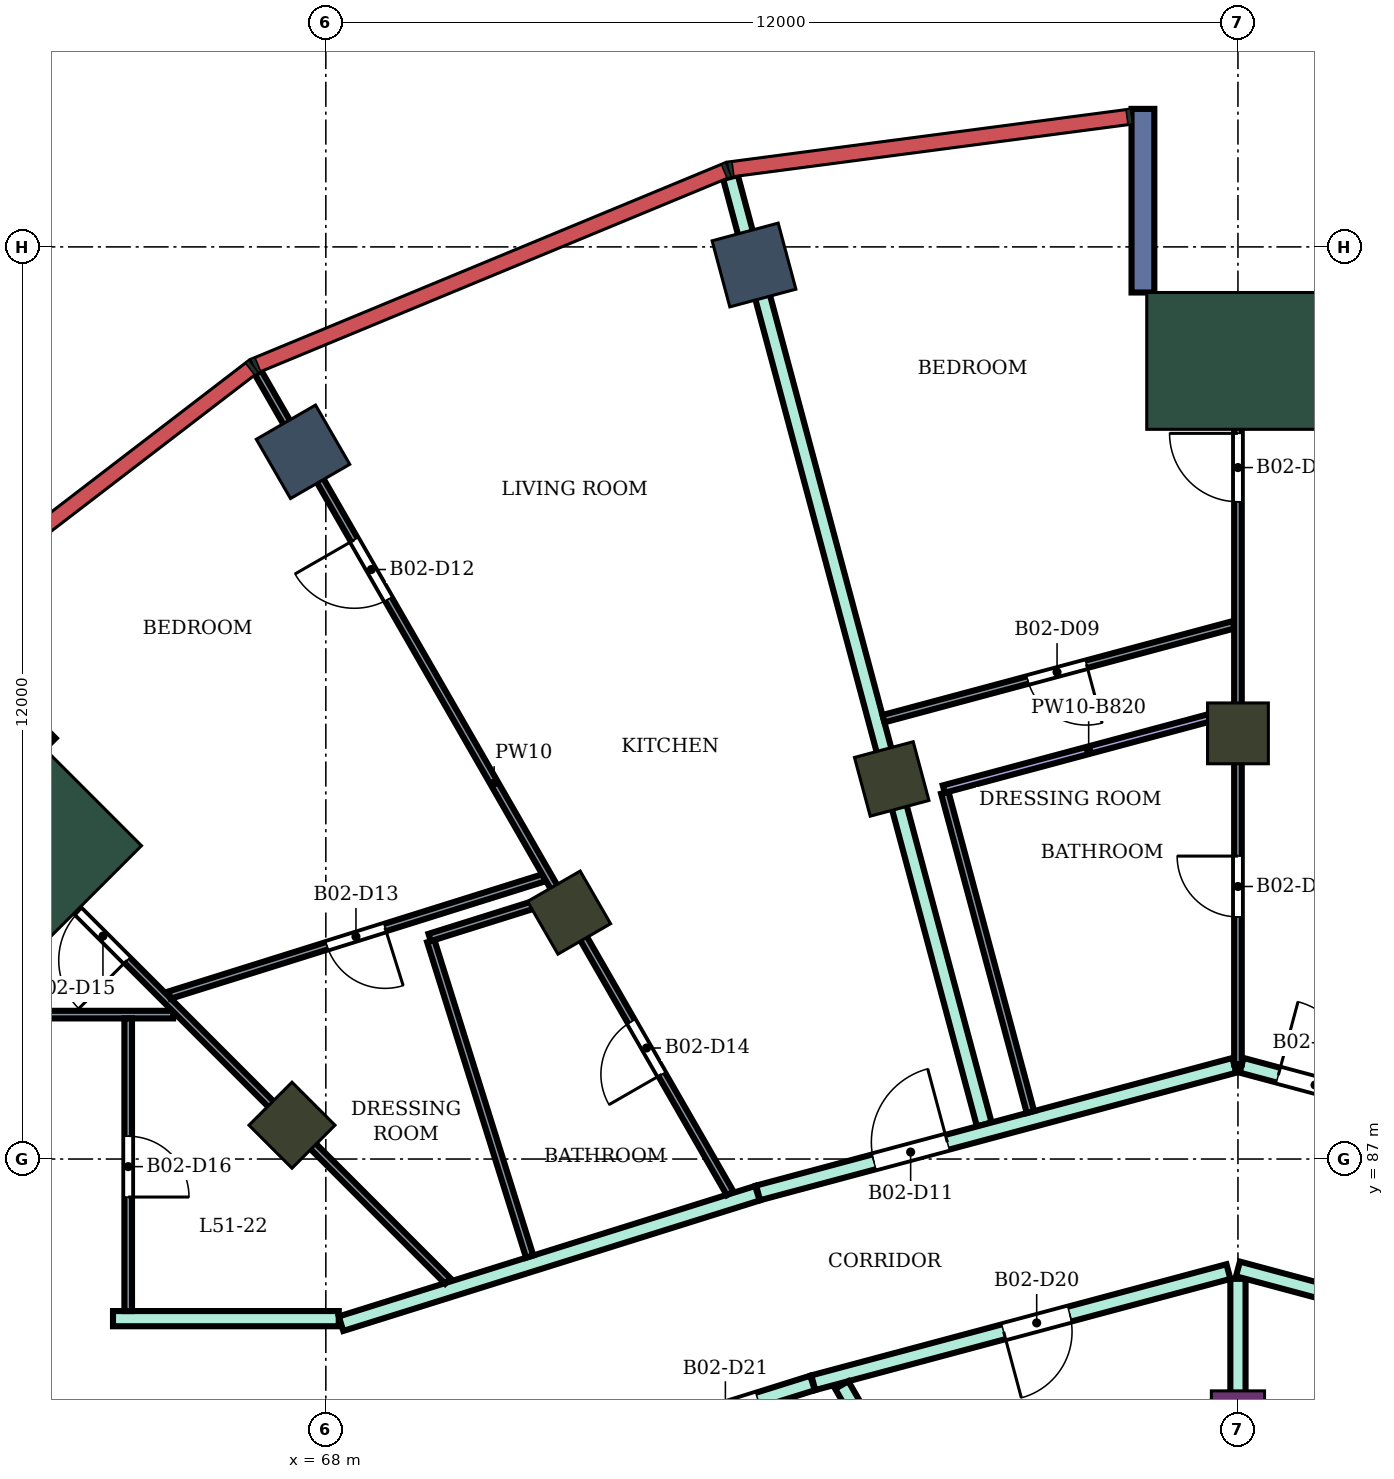
"""IFC4 building model, lengths in metres.
Left out: names, types, materials, properties, quantities, classifications, styles, units other than length and angle.
Written with IfcOpenShell. Run it as: python <this file> out.ifc"""

import sys

from ifc_helpers import new_model, si_unit, direction, frame, frame_2d, origin, origin_2d, place, context, subcontext, project, spatial, rectangle, extrude, element, fill, save


model = new_model("IFC4")
c1 = context("Model", 3, precision=1e-05, world=origin(), true_north=direction((0.0, 1.0)))
c2 = subcontext(c1, "Body", "Model", "MODEL_VIEW")
j1 = project(units=[si_unit("LENGTHUNIT", "METRE"), si_unit("PLANEANGLEUNIT", "RADIAN")], contexts=[c1])
p1 = place(None, origin())
s1 = spatial("IfcSite", under=j1, at=p1, CompositionType="ELEMENT")
p2 = place(p1, origin())
s2 = spatial("IfcBuilding", under=s1, at=p2, CompositionType="ELEMENT")
p3 = place(p2, frame((0.0, 0.0, 220.9)))
s3 = spatial("IfcBuildingStorey", under=s2, at=p3, CompositionType="ELEMENT", Elevation=220.9)
for number, where, z_axis, x_axis in (
    (1, (73.633, 98.762, 0.0), (0.0, 0.0, 1.0), (-0.259, 0.966, 0.0)),
    (2, (67.7, 96.304, 0.0), (0.0, 0.0, 1.0), (-0.5, 0.866, 0.0)),
):
    element("IfcColumn", number, at=place(p3, frame(where, z_axis=z_axis, x_axis=x_axis)), inside=s3, PredefinedType="COLUMN", context=c2, shape_type="SweptSolid", body=[
        extrude(rectangle(XDim=0.9, YDim=0.9, at=origin_2d()), origin(), (0.0, 0.0, 1.0), 4.2),
    ])
for number, where, z_axis, x_axis in (
    (3, (80.0, 92.6, 0.0), (0.0, 0.0, 1.0), (0.0, 1.0, 0.0)),
    (4, (75.445, 92.0, 0.0), (0.0, 0.0, 1.0), (-0.259, 0.966, 0.0)),
    (5, (71.2, 90.242, 0.0), (0.0, 0.0, 1.0), (-0.5, 0.866, 0.0)),
    (6, (67.555, 87.445, 0.0), (0.0, 0.0, 1.0), (-0.707, 0.707, 0.0)),
):
    element("IfcColumn", number, at=place(p3, frame(where, z_axis=z_axis, x_axis=x_axis)), inside=s3, PredefinedType="COLUMN", context=c2, shape_type="SweptSolid", body=[
        extrude(rectangle(XDim=0.8, YDim=0.8, at=origin_2d()), origin(), (0.0, 0.0, 1.0), 4.2),
    ])
p4 = place(p3, frame((80.0, 83.6, 0.0), z_axis=(0.0, 0.0, 1.0), x_axis=(0.0, 1.0, 0.0)))
e7 = element("IfcColumn", 7, at=p4, inside=s3, PredefinedType="COLUMN", context=c2, shape_type="SweptSolid", body=[
    extrude(rectangle(XDim=0.7, YDim=0.7, at=origin_2d()), origin(), (0.0, 0.0, 1.0), 4.2),
])
for number, where, z_axis, x_axis in (
    (8, (80.0, 97.5, 0.0), (0.0, 0.0, 1.0), (0.0, 1.0, 0.0)),
    (9, (64.09, 90.91, 0.0), (0.0, 0.0, 1.0), (-0.707, 0.707, 0.0)),
):
    element("IfcColumn", number, at=place(p3, frame(where, z_axis=z_axis, x_axis=x_axis)), inside=s3, PredefinedType="COLUMN", context=c2, shape_type="SweptSolid", body=[
        extrude(rectangle(XDim=1.8, YDim=2.4, at=origin_2d()), origin(), (0.0, 0.0, 1.0), 4.2),
    ])
for number, where, z_axis, x_axis in (
    (10, (78.75, 98.4, 0.0), (0.0, 0.0, 1.0), (0.0, 1.0, 0.0)),
    (11, (64.338, 92.43, 0.0), (0.0, 0.0, 1.0), (-0.707, 0.707, 0.0)),
):
    element("IfcWall", number, at=place(p3, frame(where, z_axis=z_axis, x_axis=x_axis)), inside=s3, PredefinedType="NOTDEFINED", context=c2, shape_type="SweptSolid", body=[
        extrude(rectangle(XDim=2.416, YDim=0.3, at=frame_2d((1.208, 0.0))), origin(), (0.0, 0.0, 1.0), 4.2),
    ])
p5 = place(p3, frame((65.2, 84.9, 0.0), z_axis=(0.0, 0.0, 1.0), x_axis=(1.0, 0.0, 0.0)))
e12 = element("IfcWall", 12, at=p5, inside=s3, PredefinedType="PARTITIONING", context=c2, shape_type="SweptSolid", body=[
    extrude(rectangle(XDim=2.97, YDim=0.2, at=frame_2d((1.485, 0.0))), origin(), (0.0, 0.0, 1.0), 3.75),
])
p6 = place(p3, frame((68.2, 84.834, 0.0), z_axis=(0.0, 0.0, 1.0), x_axis=(0.954260265251, 0.298977166624, 0.0)))
e13 = element("IfcWall", 13, at=p6, inside=s3, PredefinedType="PARTITIONING", context=c2, shape_type="SweptSolid", body=[
    extrude(rectangle(XDim=5.741, YDim=0.2, at=frame_2d((2.87, 0.0))), origin(), (0.0, 0.0, 1.0), 3.75),
])
p7 = place(p3, frame((72.1, 83.332, 0.0), z_axis=(0.0, 0.0, 1.0), x_axis=(0.954233106619, 0.299063836383, 0.0)))
e14 = element("IfcWall", 14, at=p7, inside=s3, PredefinedType="PARTITIONING", context=c2, shape_type="SweptSolid", body=[
    extrude(rectangle(XDim=2.414, YDim=0.2, at=frame_2d((1.207, 0.0))), origin(), (0.0, 0.0, 1.0), 3.75),
])
p8 = place(p7, frame((0.762, 0.0, 0.0)))
e15 = element("IfcOpeningElement", 15, at=p8, cuts=e14, PredefinedType="OPENING", context=c2, shape_type="SweptSolid", body=[
    extrude(rectangle(XDim=0.9, YDim=2.1, at=frame_2d((0.45, 1.05))), frame((0.0, 0.11, 0.0), z_axis=(0.0, -1.0, 0.0), x_axis=(1.0, 0.0, 0.0)), (0.0, 0.0, 1.0), 0.22),
])
p9 = place(p3, frame((73.323, 99.919, 0.0), z_axis=(0.0, 0.0, 1.0), x_axis=(0.258768239436, -0.965939438194, 0.0)))
e16 = element("IfcWall", 16, at=p9, inside=s3, PredefinedType="PARTITIONING", context=c2, shape_type="SweptSolid", body=[
    extrude(rectangle(XDim=12.904, YDim=0.2, at=frame_2d((6.452, 0.0))), origin(), (0.0, 0.0, 1.0), 3.75),
])
p10 = place(p3, frame((73.687, 86.554, 0.0), z_axis=(0.0, 0.0, 1.0), x_axis=(0.96595258731, 0.258719150952, 0.0)))
e17 = element("IfcWall", 17, at=p10, inside=s3, PredefinedType="PARTITIONING", context=c2, shape_type="SweptSolid", body=[
    extrude(rectangle(XDim=6.486, YDim=0.2, at=frame_2d((3.243, 0.0))), origin(), (0.0, 0.0, 1.0), 3.75),
])
p11 = place(p10, frame((1.578, 0.0, 0.0)))
e18 = element("IfcOpeningElement", 18, at=p11, cuts=e17, PredefinedType="OPENING", context=c2, shape_type="SweptSolid", body=[
    extrude(rectangle(XDim=1.0, YDim=2.1, at=frame_2d((0.5, 1.05))), frame((0.0, 0.11, 0.0), z_axis=(0.0, -1.0, 0.0), x_axis=(1.0, 0.0, 0.0)), (0.0, 0.0, 1.0), 0.22),
])
p12 = place(p3, frame((74.413, 84.057, 0.0), z_axis=(0.0, 0.0, 1.0), x_axis=(0.965972135939, 0.258646153246, 0.0)))
e19 = element("IfcWall", 19, at=p12, inside=s3, PredefinedType="PARTITIONING", context=c2, shape_type="SweptSolid", body=[
    extrude(rectangle(XDim=5.654, YDim=0.2, at=frame_2d((2.827, 0.0))), origin(), (0.0, 0.0, 1.0), 3.75),
])
p13 = place(p12, frame((2.593, 0.0, 0.0)))
e20 = element("IfcOpeningElement", 20, at=p13, cuts=e19, PredefinedType="OPENING", context=c2, shape_type="SweptSolid", body=[
    extrude(rectangle(XDim=0.9, YDim=2.1, at=frame_2d((0.45, 1.05))), frame((0.0, 0.11, 0.0), z_axis=(0.0, -1.0, 0.0), x_axis=(1.0, 0.0, 0.0)), (0.0, 0.0, 1.0), 0.22),
])
p14 = place(p3, frame((74.787, 84.027, 0.0), z_axis=(0.0, 0.0, 1.0), x_axis=(0.500079107518, -0.86597972622, 0.0)))
e21 = element("IfcWall", 21, at=p14, inside=s3, PredefinedType="PARTITIONING", context=c2, shape_type="SweptSolid", body=[
    extrude(rectangle(XDim=2.726, YDim=0.2, at=frame_2d((1.363, 0.0))), origin(), (0.0, 0.0, 1.0), 3.75),
])
p15 = place(p3, frame((80.0, 82.699, 0.0), z_axis=(0.0, 0.0, 1.0), x_axis=(0.0, 1.0, 0.0)))
e22 = element("IfcWall", 22, at=p15, inside=s3, PredefinedType="PARTITIONING", context=c2, shape_type="SweptSolid", body=[
    extrude(rectangle(XDim=2.725, YDim=0.2, at=frame_2d((1.363, 0.0))), origin(), (0.0, 0.0, 1.0), 3.75),
])
p16 = place(p3, frame((80.0, 85.554, 0.0), z_axis=(0.0, 0.0, 1.0), x_axis=(0.965928989968, -0.258807237802, 0.0)))
e23 = element("IfcWall", 23, at=p16, inside=s3, PredefinedType="PARTITIONING", context=c2, shape_type="SweptSolid", body=[
    extrude(rectangle(XDim=5.774, YDim=0.2, at=frame_2d((2.887, 0.0))), origin(), (0.0, 0.0, 1.0), 3.75),
])
p17 = place(p16, frame((2.292, 0.0, 0.0)))
e24 = element("IfcOpeningElement", 24, at=p17, cuts=e23, PredefinedType="OPENING", context=c2, shape_type="SweptSolid", body=[
    extrude(rectangle(XDim=0.9, YDim=2.1, at=frame_2d((0.45, 1.05))), frame((0.0, 0.11, 0.0), z_axis=(0.0, -1.0, 0.0), x_axis=(1.0, 0.0, 0.0)), (0.0, 0.0, 1.0), 0.22),
])
p18 = place(p3, frame((80.048, 88.233, 0.0), z_axis=(0.0, 0.0, 1.0), x_axis=(0.965865387308, -0.259044501198, 0.0)))
e25 = element("IfcWall", 25, at=p18, inside=s3, PredefinedType="PARTITIONING", context=c2, shape_type="SweptSolid", body=[
    extrude(rectangle(XDim=6.476, YDim=0.2, at=frame_2d((3.238, 0.0))), origin(), (0.0, 0.0, 1.0), 3.75),
])
p19 = place(p18, frame((0.5, 0.0, 0.0)))
e26 = element("IfcOpeningElement", 26, at=p19, cuts=e25, PredefinedType="OPENING", context=c2, shape_type="SweptSolid", body=[
    extrude(rectangle(XDim=1.0, YDim=2.1, at=frame_2d((0.5, 1.05))), frame((0.0, 0.11, 0.0), z_axis=(0.0, -1.0, 0.0), x_axis=(1.0, 0.0, 0.0)), (0.0, 0.0, 1.0), 0.22),
])
p20 = place(p3, frame((58.379, 88.9, 0.0), z_axis=(0.0, 0.0, 1.0), x_axis=(1.0, 0.0, 0.0)))
e27 = element("IfcWall", 27, at=p20, inside=s3, PredefinedType="PARTITIONING", context=c2, shape_type="SweptSolid", body=[
    extrude(rectangle(XDim=7.612, YDim=0.1, at=frame_2d((3.806, 0.0))), origin(), (0.0, 0.0, 1.0), 3.75),
])
p21 = place(p20, frame((3.176, 0.0, 0.0)))
e28 = element("IfcOpeningElement", 28, at=p21, cuts=e27, PredefinedType="OPENING", context=c2, shape_type="SweptSolid", body=[
    extrude(rectangle(XDim=0.8, YDim=2.1, at=frame_2d((0.4, 1.05))), frame((0.0, 0.06, 0.0), z_axis=(0.0, -1.0, 0.0), x_axis=(1.0, 0.0, 0.0)), (0.0, 0.0, 1.0), 0.12),
])
p22 = place(p3, frame((63.596, 91.406, 0.0), z_axis=(0.0, 0.0, 1.0), x_axis=(0.70700623685, -0.707207311228, 0.0)))
e29 = element("IfcWall", 29, at=p22, inside=s3, PredefinedType="PARTITIONING", context=c2, shape_type="SweptSolid", body=[
    extrude(rectangle(XDim=8.499, YDim=0.1, at=frame_2d((4.25, 0.0))), origin(), (0.0, 0.0, 1.0), 3.75),
])
p23 = place(p22, frame((1.632, 0.0, 0.0)))
e30 = element("IfcOpeningElement", 30, at=p23, cuts=e29, PredefinedType="OPENING", context=c2, shape_type="SweptSolid", body=[
    extrude(rectangle(XDim=0.9, YDim=2.1, at=frame_2d((0.45, 1.05))), frame((0.0, 0.06, 0.0), z_axis=(0.0, -1.0, 0.0), x_axis=(1.0, 0.0, 0.0)), (0.0, 0.0, 1.0), 0.12),
])
p24 = place(p3, frame((65.4, 85.0, 0.0), z_axis=(0.0, 0.0, 1.0), x_axis=(0.0, 1.0, 0.0)))
e31 = element("IfcWall", 31, at=p24, inside=s3, PredefinedType="PARTITIONING", context=c2, shape_type="SweptSolid", body=[
    extrude(rectangle(XDim=3.85, YDim=0.1, at=frame_2d((1.925, 0.0))), origin(), (0.0, 0.0, 1.0), 3.75),
])
p25 = place(p24, frame((1.5, 0.0, 0.0)))
e32 = element("IfcOpeningElement", 32, at=p25, cuts=e31, PredefinedType="OPENING", context=c2, shape_type="SweptSolid", body=[
    extrude(rectangle(XDim=0.8, YDim=2.1, at=frame_2d((0.4, 1.05))), frame((0.0, 0.06, 0.0), z_axis=(0.0, -1.0, 0.0), x_axis=(1.0, 0.0, 0.0)), (0.0, 0.0, 1.0), 0.12),
])
p26 = place(p3, frame((65.944, 89.157, 0.0), z_axis=(0.0, 0.0, 1.0), x_axis=(0.954235485309, 0.299056246512, 0.0)))
e33 = element("IfcWall", 33, at=p26, inside=s3, PredefinedType="PARTITIONING", context=c2, shape_type="SweptSolid", body=[
    extrude(rectangle(XDim=5.159, YDim=0.1, at=frame_2d((2.58, 0.0))), origin(), (0.0, 0.0, 1.0), 3.75),
])
p27 = place(p26, frame((2.17, 0.0, 0.0)))
e34 = element("IfcOpeningElement", 34, at=p27, cuts=e33, PredefinedType="OPENING", context=c2, shape_type="SweptSolid", body=[
    extrude(rectangle(XDim=0.8, YDim=2.1, at=frame_2d((0.4, 1.05))), frame((0.0, 0.06, 0.0), z_axis=(0.0, -1.0, 0.0), x_axis=(1.0, 0.0, 0.0)), (0.0, 0.0, 1.0), 0.12),
])
p28 = place(p3, frame((67.109, 97.346, 0.0), z_axis=(0.0, 0.0, 1.0), x_axis=(0.498583439824, -0.866841711925, 0.0)))
e35 = element("IfcWall", 35, at=p28, inside=s3, PredefinedType="PARTITIONING", context=c2, shape_type="SweptSolid", body=[
    extrude(rectangle(XDim=12.456, YDim=0.1, at=frame_2d((6.228, 0.0))), origin(), (0.0, 0.0, 1.0), 3.75),
])
p29 = place(p28, frame((2.538, 0.0, 0.0)))
e36 = element("IfcOpeningElement", 36, at=p29, cuts=e35, PredefinedType="OPENING", context=c2, shape_type="SweptSolid", body=[
    extrude(rectangle(XDim=0.9, YDim=2.1, at=frame_2d((0.45, 1.05))), frame((0.0, 0.06, 0.0), z_axis=(0.0, -1.0, 0.0), x_axis=(1.0, 0.0, 0.0)), (0.0, 0.0, 1.0), 0.12),
])
p30 = place(p28, frame((9.85, 0.0, 0.0)))
e37 = element("IfcOpeningElement", 37, at=p30, cuts=e35, PredefinedType="OPENING", context=c2, shape_type="SweptSolid", body=[
    extrude(rectangle(XDim=0.8, YDim=2.1, at=frame_2d((0.4, 1.05))), frame((0.0, 0.06, 0.0), z_axis=(0.0, -1.0, 0.0), x_axis=(1.0, 0.0, 0.0)), (0.0, 0.0, 1.0), 0.12),
])
p31 = place(p3, frame((69.381, 89.867, 0.0), z_axis=(0.0, 0.0, 1.0), x_axis=(0.29908659099, -0.954225974856, 0.0)))
e38 = element("IfcWall", 38, at=p31, inside=s3, PredefinedType="PARTITIONING", context=c2, shape_type="SweptSolid", body=[
    extrude(rectangle(XDim=4.35, YDim=0.1, at=frame_2d((2.175, 0.0))), origin(), (0.0, 0.0, 1.0), 3.75),
])
p32 = place(p3, frame((69.366, 89.915, 0.0), z_axis=(0.0, 0.0, 1.0), x_axis=(0.954163830168, 0.299284789457, 0.0)))
e39 = element("IfcWall", 39, at=p32, inside=s3, PredefinedType="PARTITIONING", context=c2, shape_type="SweptSolid", body=[
    extrude(rectangle(XDim=1.734, YDim=0.1, at=frame_2d((0.867, 0.0))), origin(), (0.0, 0.0, 1.0), 3.75),
])
p33 = place(p3, frame((75.337, 92.793, 0.0), z_axis=(0.0, 0.0, 1.0), x_axis=(0.965840336715, 0.259137886026, 0.0)))
e40 = element("IfcWall", 40, at=p33, inside=s3, PredefinedType="PARTITIONING", context=c2, shape_type="SweptSolid", body=[
    extrude(rectangle(XDim=4.768, YDim=0.1, at=frame_2d((2.384, 0.0))), origin(), (0.0, 0.0, 1.0), 3.75),
])
p34 = place(p33, frame((1.964, 0.0, 0.0)))
e41 = element("IfcOpeningElement", 41, at=p34, cuts=e40, PredefinedType="OPENING", context=c2, shape_type="SweptSolid", body=[
    extrude(rectangle(XDim=0.8, YDim=2.1, at=frame_2d((0.4, 1.05))), frame((0.0, 0.06, 0.0), z_axis=(0.0, -1.0, 0.0), x_axis=(1.0, 0.0, 0.0)), (0.0, 0.0, 1.0), 0.12),
])
p35 = place(p3, frame((76.143, 91.819, 0.0), z_axis=(0.0, 0.0, 1.0), x_axis=(0.259115794116, -0.965846263771, 0.0)))
e42 = element("IfcWall", 42, at=p35, inside=s3, PredefinedType="PARTITIONING", context=c2, shape_type="SweptSolid", body=[
    extrude(rectangle(XDim=4.349, YDim=0.1, at=frame_2d((2.175, 0.0))), origin(), (0.0, 0.0, 1.0), 3.75),
])
p36 = place(p3, frame((76.13, 91.867, 0.0), z_axis=(0.0, 0.0, 1.0), x_axis=(0.965860204905, 0.259063823373, 0.0)))
e43 = element("IfcWall", 43, at=p36, inside=s3, PredefinedType="PARTITIONING", context=c2, shape_type="SweptSolid", body=[
    extrude(rectangle(XDim=3.947, YDim=0.1, at=frame_2d((1.973, 0.0))), origin(), (0.0, 0.0, 1.0), 3.38),
])
p37 = place(p3, frame((80.0, 88.246, 0.0), z_axis=(0.0, 0.0, 1.0), x_axis=(0.0, 1.0, 0.0)))
e44 = element("IfcWall", 44, at=p37, inside=s3, PredefinedType="PARTITIONING", context=c2, shape_type="SweptSolid", body=[
    extrude(rectangle(XDim=9.954, YDim=0.1, at=frame_2d((4.977, 0.0))), origin(), (0.0, 0.0, 1.0), 3.75),
])
p38 = place(p37, frame((7.401, 0.0, 0.0)))
e45 = element("IfcOpeningElement", 45, at=p38, cuts=e44, PredefinedType="OPENING", context=c2, shape_type="SweptSolid", body=[
    extrude(rectangle(XDim=0.9, YDim=2.1, at=frame_2d((0.45, 1.05))), frame((0.0, 0.06, 0.0), z_axis=(0.0, -1.0, 0.0), x_axis=(1.0, 0.0, 0.0)), (0.0, 0.0, 1.0), 0.12),
])
p39 = place(p37, frame((1.939, 0.0, 0.0)))
e46 = element("IfcOpeningElement", 46, at=p39, cuts=e44, PredefinedType="OPENING", context=c2, shape_type="SweptSolid", body=[
    extrude(rectangle(XDim=0.8, YDim=2.1, at=frame_2d((0.4, 1.05))), frame((0.0, 0.06, 0.0), z_axis=(0.0, -1.0, 0.0), x_axis=(1.0, 0.0, 0.0)), (0.0, 0.0, 1.0), 0.12),
])
p40 = place(p19, origin())
e47 = element("IfcDoor", 47, at=p40, inside=s3, OperationType="SINGLE_SWING_LEFT", PredefinedType="DOOR", context=c2, shape_type="SweptSolid", body=[
    extrude(rectangle(XDim=1.0, YDim=2.1, at=frame_2d((0.5, 1.05))), frame((0.0, 0.025, 0.0), z_axis=(0.0, -1.0, 0.0), x_axis=(1.0, 0.0, 0.0)), (0.0, 0.0, 1.0), 0.05),
])
fill(e26, e47)
p41 = place(p38, origin())
e48 = element("IfcDoor", 48, at=p41, inside=s3, OperationType="SINGLE_SWING_RIGHT", PredefinedType="DOOR", context=c2, shape_type="SweptSolid", body=[
    extrude(rectangle(XDim=0.9, YDim=2.1, at=frame_2d((0.45, 1.05))), frame((0.0, 0.025, 0.0), z_axis=(0.0, -1.0, 0.0), x_axis=(1.0, 0.0, 0.0)), (0.0, 0.0, 1.0), 0.05),
])
fill(e45, e48)
p42 = place(p34, frame((0.8, 0.0, 0.0), z_axis=(0.0, 0.0, 1.0), x_axis=(-1.0, 0.0, 0.0)))
e49 = element("IfcDoor", 49, at=p42, inside=s3, OperationType="SINGLE_SWING_LEFT", PredefinedType="DOOR", context=c2, shape_type="SweptSolid", body=[
    extrude(rectangle(XDim=0.8, YDim=2.1, at=frame_2d((0.4, 1.05))), frame((0.0, 0.025, 0.0), z_axis=(0.0, -1.0, 0.0), x_axis=(1.0, 0.0, 0.0)), (0.0, 0.0, 1.0), 0.05),
])
fill(e41, e49)
p43 = place(p39, origin())
e50 = element("IfcDoor", 50, at=p43, inside=s3, OperationType="SINGLE_SWING_RIGHT", PredefinedType="DOOR", context=c2, shape_type="SweptSolid", body=[
    extrude(rectangle(XDim=0.8, YDim=2.1, at=frame_2d((0.4, 1.05))), frame((0.0, 0.025, 0.0), z_axis=(0.0, -1.0, 0.0), x_axis=(1.0, 0.0, 0.0)), (0.0, 0.0, 1.0), 0.05),
])
fill(e46, e50)
p44 = place(p11, origin())
e51 = element("IfcDoor", 51, at=p44, inside=s3, OperationType="SINGLE_SWING_RIGHT", PredefinedType="DOOR", context=c2, shape_type="SweptSolid", body=[
    extrude(rectangle(XDim=1.0, YDim=2.1, at=frame_2d((0.5, 1.05))), frame((0.0, 0.025, 0.0), z_axis=(0.0, -1.0, 0.0), x_axis=(1.0, 0.0, 0.0)), (0.0, 0.0, 1.0), 0.05),
])
fill(e18, e51)
p45 = place(p29, frame((0.9, 0.0, 0.0), z_axis=(0.0, 0.0, 1.0), x_axis=(-1.0, 0.0, 0.0)))
e52 = element("IfcDoor", 52, at=p45, inside=s3, OperationType="SINGLE_SWING_RIGHT", PredefinedType="DOOR", context=c2, shape_type="SweptSolid", body=[
    extrude(rectangle(XDim=0.9, YDim=2.1, at=frame_2d((0.45, 1.05))), frame((0.0, 0.025, 0.0), z_axis=(0.0, -1.0, 0.0), x_axis=(1.0, 0.0, 0.0)), (0.0, 0.0, 1.0), 0.05),
])
fill(e36, e52)
p46 = place(p27, frame((0.8, 0.0, 0.0), z_axis=(0.0, 0.0, 1.0), x_axis=(-1.0, 0.0, 0.0)))
e53 = element("IfcDoor", 53, at=p46, inside=s3, OperationType="SINGLE_SWING_LEFT", PredefinedType="DOOR", context=c2, shape_type="SweptSolid", body=[
    extrude(rectangle(XDim=0.8, YDim=2.1, at=frame_2d((0.4, 1.05))), frame((0.0, 0.025, 0.0), z_axis=(0.0, -1.0, 0.0), x_axis=(1.0, 0.0, 0.0)), (0.0, 0.0, 1.0), 0.05),
])
fill(e34, e53)
p47 = place(p30, frame((0.8, 0.0, 0.0), z_axis=(0.0, 0.0, 1.0), x_axis=(-1.0, 0.0, 0.0)))
e54 = element("IfcDoor", 54, at=p47, inside=s3, OperationType="SINGLE_SWING_LEFT", PredefinedType="DOOR", context=c2, shape_type="SweptSolid", body=[
    extrude(rectangle(XDim=0.8, YDim=2.1, at=frame_2d((0.4, 1.05))), frame((0.0, 0.025, 0.0), z_axis=(0.0, -1.0, 0.0), x_axis=(1.0, 0.0, 0.0)), (0.0, 0.0, 1.0), 0.05),
])
fill(e37, e54)
p48 = place(p23, frame((0.9, 0.0, 0.0), z_axis=(0.0, 0.0, 1.0), x_axis=(-1.0, 0.0, 0.0)))
e55 = element("IfcDoor", 55, at=p48, inside=s3, OperationType="SINGLE_SWING_LEFT", PredefinedType="DOOR", context=c2, shape_type="SweptSolid", body=[
    extrude(rectangle(XDim=0.9, YDim=2.1, at=frame_2d((0.45, 1.05))), frame((0.0, 0.025, 0.0), z_axis=(0.0, -1.0, 0.0), x_axis=(1.0, 0.0, 0.0)), (0.0, 0.0, 1.0), 0.05),
])
fill(e30, e55)
p49 = place(p25, frame((0.8, 0.0, 0.0), z_axis=(0.0, 0.0, 1.0), x_axis=(-1.0, 0.0, 0.0)))
e56 = element("IfcDoor", 56, at=p49, inside=s3, OperationType="SINGLE_SWING_RIGHT", PredefinedType="DOOR", context=c2, shape_type="SweptSolid", body=[
    extrude(rectangle(XDim=0.8, YDim=2.1, at=frame_2d((0.4, 1.05))), frame((0.0, 0.025, 0.0), z_axis=(0.0, -1.0, 0.0), x_axis=(1.0, 0.0, 0.0)), (0.0, 0.0, 1.0), 0.05),
])
fill(e32, e56)
p50 = place(p13, frame((0.9, 0.0, 0.0), z_axis=(0.0, 0.0, 1.0), x_axis=(-1.0, 0.0, 0.0)))
e57 = element("IfcDoor", 57, at=p50, inside=s3, OperationType="SINGLE_SWING_RIGHT", PredefinedType="DOOR", context=c2, shape_type="SweptSolid", body=[
    extrude(rectangle(XDim=0.9, YDim=2.1, at=frame_2d((0.45, 1.05))), frame((0.0, 0.025, 0.0), z_axis=(0.0, -1.0, 0.0), x_axis=(1.0, 0.0, 0.0)), (0.0, 0.0, 1.0), 0.05),
])
fill(e20, e57)
p51 = place(p8, frame((0.9, 0.0, 0.0), z_axis=(0.0, 0.0, 1.0), x_axis=(-1.0, 0.0, 0.0)))
e58 = element("IfcDoor", 58, at=p51, inside=s3, OperationType="SINGLE_SWING_RIGHT", PredefinedType="DOOR", context=c2, shape_type="SweptSolid", body=[
    extrude(rectangle(XDim=0.9, YDim=2.1, at=frame_2d((0.45, 1.05))), frame((0.0, 0.025, 0.0), z_axis=(0.0, -1.0, 0.0), x_axis=(1.0, 0.0, 0.0)), (0.0, 0.0, 1.0), 0.05),
])
fill(e15, e58)
save(model, sys.argv[1])
